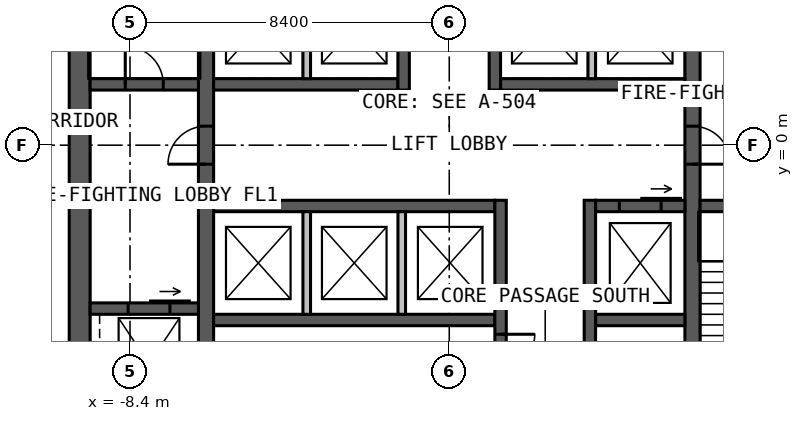
"""IFC4 building model, lengths in metres.
Left out: names, types, materials, properties, quantities, classifications, styles, units other than length and angle.
Written with IfcOpenShell. Run it as: python <this file> out.ifc"""

import sys

from ifc_helpers import new_model, si_unit, direction, frame, frame_2d, origin, place, context, subcontext, project, spatial, rectangle, extrude, element, fill, save


model = new_model("IFC4")
c1 = context("Model", 3, precision=1e-05, world=origin(), true_north=direction((0.0, 1.0)))
c2 = subcontext(c1, "Body", "Model", "MODEL_VIEW")
j1 = project(units=[si_unit("LENGTHUNIT", "METRE"), si_unit("PLANEANGLEUNIT", "RADIAN")], contexts=[c1])
p1 = place(None, origin())
s1 = spatial("IfcSite", under=j1, at=p1, CompositionType="ELEMENT")
p2 = place(p1, origin())
s2 = spatial("IfcBuilding", under=s1, at=p2, CompositionType="ELEMENT")
p3 = place(p2, frame((0.0, 0.0, 150.0)))
s3 = spatial("IfcBuildingStorey", under=s2, at=p3, CompositionType="ELEMENT", Elevation=150.0)
p4 = place(p3, frame((-9.725, 9.45, 0.0), z_axis=(0.0, 0.0, 1.0), x_axis=(0.0, -1.0, 0.0)))
e1 = element("IfcWall", 1, at=p4, inside=s3, PredefinedType="SOLIDWALL", context=c2, shape_type="SweptSolid", body=[
    extrude(rectangle(XDim=18.9, YDim=0.55, at=frame_2d((9.45, 0.0))), origin(), (0.0, 0.0, 1.0), 5.0),
])
p5 = place(p3, frame((-6.4, -9.45, 0.0), z_axis=(0.0, 0.0, 1.0), x_axis=(0.0, 1.0, 0.0)))
e2 = element("IfcWall", 2, at=p5, inside=s3, PredefinedType="SOLIDWALL", context=c2, shape_type="SweptSolid", body=[
    extrude(rectangle(XDim=18.9, YDim=0.4, at=frame_2d((9.45, 0.0))), origin(), (0.0, 0.0, 1.0), 5.0),
])
p6 = place(p5, frame((8.95, 0.0, 0.0)))
e3 = element("IfcOpeningElement", 3, at=p6, cuts=e2, PredefinedType="OPENING", context=c2, shape_type="SweptSolid", body=[
    extrude(rectangle(XDim=1.0, YDim=2.2, at=frame_2d((0.5, 1.1))), frame((0.0, 0.21, 0.0), z_axis=(0.0, -1.0, 0.0), x_axis=(1.0, 0.0, 0.0)), (0.0, 0.0, 1.0), 0.42),
])
p7 = place(p3, frame((6.4, 9.45, 0.0), z_axis=(0.0, 0.0, 1.0), x_axis=(0.0, -1.0, 0.0)))
e4 = element("IfcWall", 4, at=p7, inside=s3, PredefinedType="SOLIDWALL", context=c2, shape_type="SweptSolid", body=[
    extrude(rectangle(XDim=18.9, YDim=0.4, at=frame_2d((9.45, 0.0))), origin(), (0.0, 0.0, 1.0), 5.0),
])
p8 = place(p7, frame((8.95, 0.0, 0.0)))
e5 = element("IfcOpeningElement", 5, at=p8, cuts=e4, PredefinedType="OPENING", context=c2, shape_type="SweptSolid", body=[
    extrude(rectangle(XDim=1.0, YDim=2.2, at=frame_2d((0.5, 1.1))), frame((0.0, 0.21, 0.0), z_axis=(0.0, -1.0, 0.0), x_axis=(1.0, 0.0, 0.0)), (0.0, 0.0, 1.0), 0.42),
])
for number, where, z_axis, x_axis in (
    (6, (-6.2, 1.6, 0.0), (0.0, 0.0, 1.0), (1.0, 0.0, 0.0)),
    (7, (1.35, 1.6, 0.0), (0.0, 0.0, 1.0), (1.0, 0.0, 0.0)),
):
    element("IfcWall", number, at=place(p3, frame(where, z_axis=z_axis, x_axis=x_axis)), inside=s3, PredefinedType="SOLIDWALL", context=c2, shape_type="SweptSolid", body=[
        extrude(rectangle(XDim=4.85, YDim=0.3, at=frame_2d((2.425, 0.0))), origin(), (0.0, 0.0, 1.0), 5.0),
    ])
p9 = place(p3, frame((-1.2, 1.45, 0.0), z_axis=(0.0, 0.0, 1.0), x_axis=(0.0, 1.0, 0.0)))
e8 = element("IfcWall", 8, at=p9, inside=s3, PredefinedType="SOLIDWALL", context=c2, shape_type="SweptSolid", body=[
    extrude(rectangle(XDim=8.0, YDim=0.3, at=frame_2d((4.0, 0.0))), origin(), (0.0, 0.0, 1.0), 5.0),
])
p10 = place(p9, frame((5.05, 0.0, 0.0)))
e9 = element("IfcOpeningElement", 9, at=p10, cuts=e8, PredefinedType="OPENING", context=c2, shape_type="SweptSolid", body=[
    extrude(rectangle(XDim=1.0, YDim=2.2, at=frame_2d((0.5, 1.1))), frame((0.0, 0.16, 0.0), z_axis=(0.0, -1.0, 0.0), x_axis=(1.0, 0.0, 0.0)), (0.0, 0.0, 1.0), 0.32),
])
p11 = place(p3, frame((1.2, 1.45, 0.0), z_axis=(0.0, 0.0, 1.0), x_axis=(0.0, 1.0, 0.0)))
e10 = element("IfcWall", 10, at=p11, inside=s3, PredefinedType="SOLIDWALL", context=c2, shape_type="SweptSolid", body=[
    extrude(rectangle(XDim=8.0, YDim=0.3, at=frame_2d((4.0, 0.0))), origin(), (0.0, 0.0, 1.0), 5.0),
])
p12 = place(p11, frame((3.8, 0.0, 0.0)))
e11 = element("IfcOpeningElement", 11, at=p12, cuts=e10, PredefinedType="OPENING", context=c2, shape_type="SweptSolid", body=[
    extrude(rectangle(XDim=1.0, YDim=2.2, at=frame_2d((0.5, 1.1))), frame((0.0, 0.16, 0.0), z_axis=(0.0, -1.0, 0.0), x_axis=(1.0, 0.0, 0.0)), (0.0, 0.0, 1.0), 0.32),
])
p13 = place(p11, frame((6.15, 0.0, 0.0)))
e12 = element("IfcOpeningElement", 12, at=p13, cuts=e10, PredefinedType="OPENING", context=c2, shape_type="SweptSolid", body=[
    extrude(rectangle(XDim=1.0, YDim=2.2, at=frame_2d((0.5, 1.1))), frame((0.0, 0.16, 0.0), z_axis=(0.0, -1.0, 0.0), x_axis=(1.0, 0.0, 0.0)), (0.0, 0.0, 1.0), 0.32),
])
p14 = place(p3, frame((-6.2, -1.6, 0.0), z_axis=(0.0, 0.0, 1.0), x_axis=(1.0, 0.0, 0.0)))
e13 = element("IfcWall", 13, at=p14, inside=s3, PredefinedType="SOLIDWALL", context=c2, shape_type="SweptSolid", body=[
    extrude(rectangle(XDim=7.4, YDim=0.3, at=frame_2d((3.7, 0.0))), origin(), (0.0, 0.0, 1.0), 5.0),
])
p15 = place(p3, frame((3.85, -1.6, 0.0), z_axis=(0.0, 0.0, 1.0), x_axis=(1.0, 0.0, 0.0)))
e14 = element("IfcWall", 14, at=p15, inside=s3, PredefinedType="SOLIDWALL", context=c2, shape_type="SweptSolid", body=[
    extrude(rectangle(XDim=2.35, YDim=0.3, at=frame_2d((1.175, 0.0))), origin(), (0.0, 0.0, 1.0), 5.0),
])
p16 = place(p15, frame((0.625, 0.0, 0.0)))
e15 = element("IfcOpeningElement", 15, at=p16, cuts=e14, PredefinedType="OPENING", context=c2, shape_type="SweptSolid", body=[
    extrude(rectangle(XDim=1.1, YDim=2.2, at=frame_2d((0.55, 1.1))), frame((0.0, 0.16, 0.0), z_axis=(0.0, -1.0, 0.0), x_axis=(1.0, 0.0, 0.0)), (0.0, 0.0, 1.0), 0.32),
])
p17 = place(p3, frame((-6.2, -4.6, 0.0), z_axis=(0.0, 0.0, 1.0), x_axis=(1.0, 0.0, 0.0)))
e16 = element("IfcWall", 16, at=p17, inside=s3, PredefinedType="SOLIDWALL", context=c2, shape_type="SweptSolid", body=[
    extrude(rectangle(XDim=7.4, YDim=0.3, at=frame_2d((3.7, 0.0))), origin(), (0.0, 0.0, 1.0), 5.0),
])
p18 = place(p3, frame((3.85, -4.6, 0.0), z_axis=(0.0, 0.0, 1.0), x_axis=(1.0, 0.0, 0.0)))
e17 = element("IfcWall", 17, at=p18, inside=s3, PredefinedType="SOLIDWALL", context=c2, shape_type="SweptSolid", body=[
    extrude(rectangle(XDim=2.35, YDim=0.3, at=frame_2d((1.175, 0.0))), origin(), (0.0, 0.0, 1.0), 5.0),
])
p19 = place(p3, frame((1.35, -1.45, 0.0), z_axis=(0.0, 0.0, 1.0), x_axis=(0.0, -1.0, 0.0)))
e18 = element("IfcWall", 18, at=p19, inside=s3, PredefinedType="SOLIDWALL", context=c2, shape_type="SweptSolid", body=[
    extrude(rectangle(XDim=8.0, YDim=0.3, at=frame_2d((4.0, 0.0))), origin(), (0.0, 0.0, 1.0), 5.0),
])
p20 = place(p19, frame((5.925, 0.0, 0.0)))
e19 = element("IfcOpeningElement", 19, at=p20, cuts=e18, PredefinedType="OPENING", context=c2, shape_type="SweptSolid", body=[
    extrude(rectangle(XDim=1.0, YDim=2.2, at=frame_2d((0.5, 1.1))), frame((0.0, 0.16, 0.0), z_axis=(0.0, -1.0, 0.0), x_axis=(1.0, 0.0, 0.0)), (0.0, 0.0, 1.0), 0.32),
])
p21 = place(p19, frame((3.525, 0.0, 0.0)))
e20 = element("IfcOpeningElement", 20, at=p21, cuts=e18, PredefinedType="OPENING", context=c2, shape_type="SweptSolid", body=[
    extrude(rectangle(XDim=0.9, YDim=2.2, at=frame_2d((0.45, 1.1))), frame((0.0, 0.16, 0.0), z_axis=(0.0, -1.0, 0.0), x_axis=(1.0, 0.0, 0.0)), (0.0, 0.0, 1.0), 0.32),
])
p22 = place(p3, frame((3.7, -1.45, 0.0), z_axis=(0.0, 0.0, 1.0), x_axis=(0.0, -1.0, 0.0)))
e21 = element("IfcWall", 21, at=p22, inside=s3, PredefinedType="SOLIDWALL", context=c2, shape_type="SweptSolid", body=[
    extrude(rectangle(XDim=8.0, YDim=0.3, at=frame_2d((4.0, 0.0))), origin(), (0.0, 0.0, 1.0), 5.0),
])
p23 = place(p22, frame((5.1, 0.0, 0.0)))
e22 = element("IfcOpeningElement", 22, at=p23, cuts=e21, PredefinedType="OPENING", context=c2, shape_type="SweptSolid", body=[
    extrude(rectangle(XDim=0.9, YDim=2.2, at=frame_2d((0.45, 1.1))), frame((0.0, 0.16, 0.0), z_axis=(0.0, -1.0, 0.0), x_axis=(1.0, 0.0, 0.0)), (0.0, 0.0, 1.0), 0.32),
])
p24 = place(p3, frame((-9.45, 1.6, 0.0), z_axis=(0.0, 0.0, 1.0), x_axis=(1.0, 0.0, 0.0)))
e23 = element("IfcWall", 23, at=p24, inside=s3, PredefinedType="SOLIDWALL", context=c2, shape_type="SweptSolid", body=[
    extrude(rectangle(XDim=2.85, YDim=0.3, at=frame_2d((1.425, 0.0))), origin(), (0.0, 0.0, 1.0), 5.0),
])
p25 = place(p24, frame((0.925, 0.0, 0.0)))
e24 = element("IfcOpeningElement", 24, at=p25, cuts=e23, PredefinedType="OPENING", context=c2, shape_type="SweptSolid", body=[
    extrude(rectangle(XDim=1.0, YDim=2.2, at=frame_2d((0.5, 1.1))), frame((0.0, 0.16, 0.0), z_axis=(0.0, -1.0, 0.0), x_axis=(1.0, 0.0, 0.0)), (0.0, 0.0, 1.0), 0.32),
])
p26 = place(p3, frame((6.6, -1.6, 0.0), z_axis=(0.0, 0.0, 1.0), x_axis=(1.0, 0.0, 0.0)))
e25 = element("IfcWall", 25, at=p26, inside=s3, PredefinedType="SOLIDWALL", context=c2, shape_type="SweptSolid", body=[
    extrude(rectangle(XDim=2.85, YDim=0.3, at=frame_2d((1.425, 0.0))), origin(), (0.0, 0.0, 1.0), 5.0),
])
p27 = place(p26, frame((0.925, 0.0, 0.0)))
e26 = element("IfcOpeningElement", 26, at=p27, cuts=e25, PredefinedType="OPENING", context=c2, shape_type="SweptSolid", body=[
    extrude(rectangle(XDim=1.0, YDim=2.2, at=frame_2d((0.5, 1.1))), frame((0.0, 0.16, 0.0), z_axis=(0.0, -1.0, 0.0), x_axis=(1.0, 0.0, 0.0)), (0.0, 0.0, 1.0), 0.32),
])
p28 = place(p3, frame((-9.45, -4.3, 0.0), z_axis=(0.0, 0.0, 1.0), x_axis=(1.0, 0.0, 0.0)))
e27 = element("IfcWall", 27, at=p28, inside=s3, PredefinedType="SOLIDWALL", context=c2, shape_type="SweptSolid", body=[
    extrude(rectangle(XDim=2.85, YDim=0.3, at=frame_2d((1.425, 0.0))), origin(), (0.0, 0.0, 1.0), 5.0),
])
p29 = place(p28, frame((1.0, 0.0, 0.0)))
e28 = element("IfcOpeningElement", 28, at=p29, cuts=e27, PredefinedType="OPENING", context=c2, shape_type="SweptSolid", body=[
    extrude(rectangle(XDim=1.1, YDim=2.2, at=frame_2d((0.55, 1.1))), frame((0.0, 0.16, 0.0), z_axis=(0.0, -1.0, 0.0), x_axis=(1.0, 0.0, 0.0)), (0.0, 0.0, 1.0), 0.32),
])
for number, where, z_axis, x_axis in (
    (29, (-3.75, 1.75, 0.0), (0.0, 0.0, 1.0), (0.0, 1.0, 0.0)),
    (30, (3.75, 1.75, 0.0), (0.0, 0.0, 1.0), (0.0, 1.0, 0.0)),
    (31, (-3.75, -1.75, 0.0), (0.0, 0.0, 1.0), (0.0, -1.0, 0.0)),
    (32, (-1.25, -1.75, 0.0), (0.0, 0.0, 1.0), (0.0, -1.0, 0.0)),
):
    element("IfcWall", number, at=place(p3, frame(where, z_axis=z_axis, x_axis=x_axis)), inside=s3, PredefinedType="SOLIDWALL", context=c2, shape_type="SweptSolid", body=[
        extrude(rectangle(XDim=2.7, YDim=0.2, at=frame_2d((1.35, 0.0))), origin(), (0.0, 0.0, 1.0), 4.75),
    ])
p30 = place(p6, origin())
e33 = element("IfcDoor", 33, at=p30, inside=s3, OperationType="SINGLE_SWING_LEFT", PredefinedType="DOOR", context=c2, shape_type="SweptSolid", body=[
    extrude(rectangle(XDim=1.0, YDim=2.2, at=frame_2d((0.5, 1.1))), frame((0.0, 0.025, 0.0), z_axis=(0.0, -1.0, 0.0), x_axis=(1.0, 0.0, 0.0)), (0.0, 0.0, 1.0), 0.05),
])
fill(e3, e33)
p31 = place(p8, origin())
e34 = element("IfcDoor", 34, at=p31, inside=s3, OperationType="SINGLE_SWING_RIGHT", PredefinedType="DOOR", context=c2, shape_type="SweptSolid", body=[
    extrude(rectangle(XDim=1.0, YDim=2.2, at=frame_2d((0.5, 1.1))), frame((0.0, 0.025, 0.0), z_axis=(0.0, -1.0, 0.0), x_axis=(1.0, 0.0, 0.0)), (0.0, 0.0, 1.0), 0.05),
])
fill(e5, e34)
p32 = place(p25, origin())
e35 = element("IfcDoor", 35, at=p32, inside=s3, OperationType="SINGLE_SWING_LEFT", PredefinedType="DOOR", context=c2, shape_type="SweptSolid", body=[
    extrude(rectangle(XDim=1.0, YDim=2.2, at=frame_2d((0.5, 1.1))), frame((0.0, 0.025, 0.0), z_axis=(0.0, -1.0, 0.0), x_axis=(1.0, 0.0, 0.0)), (0.0, 0.0, 1.0), 0.05),
])
fill(e24, e35)
p33 = place(p21, origin())
e36 = element("IfcDoor", 36, at=p33, inside=s3, OperationType="SINGLE_SWING_LEFT", PredefinedType="DOOR", context=c2, shape_type="SweptSolid", body=[
    extrude(rectangle(XDim=0.9, YDim=2.2, at=frame_2d((0.45, 1.1))), frame((0.0, 0.025, 0.0), z_axis=(0.0, -1.0, 0.0), x_axis=(1.0, 0.0, 0.0)), (0.0, 0.0, 1.0), 0.05),
])
fill(e20, e36)
p34 = place(p16, origin())
e37 = element("IfcDoor", 37, at=p34, inside=s3, OperationType="SLIDING_TO_LEFT", PredefinedType="DOOR", context=c2, shape_type="SweptSolid", body=[
    extrude(rectangle(XDim=1.1, YDim=2.2, at=frame_2d((0.55, 1.1))), frame((0.0, 0.025, 0.0), z_axis=(0.0, -1.0, 0.0), x_axis=(1.0, 0.0, 0.0)), (0.0, 0.0, 1.0), 0.05),
])
fill(e15, e37)
p35 = place(p29, origin())
e38 = element("IfcDoor", 38, at=p35, inside=s3, OperationType="SLIDING_TO_LEFT", PredefinedType="DOOR", context=c2, shape_type="SweptSolid", body=[
    extrude(rectangle(XDim=1.1, YDim=2.2, at=frame_2d((0.55, 1.1))), frame((0.0, 0.025, 0.0), z_axis=(0.0, -1.0, 0.0), x_axis=(1.0, 0.0, 0.0)), (0.0, 0.0, 1.0), 0.05),
])
fill(e28, e38)
save(model, sys.argv[1])
